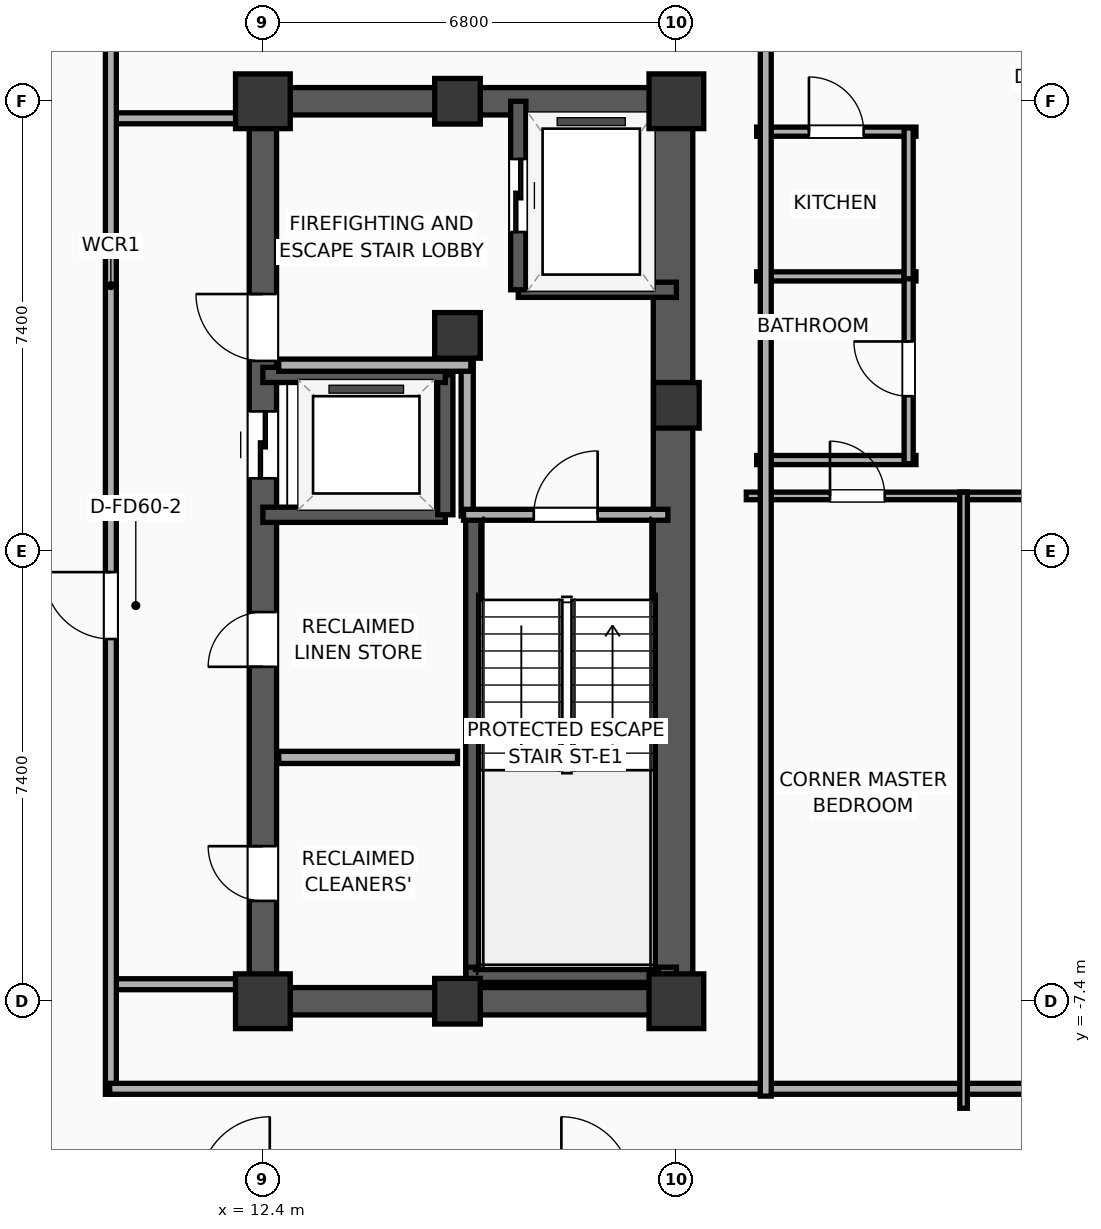
"""IFC4 building model, lengths in metres.
Left out: names, types, materials, properties, quantities, classifications, styles, units other than length and angle.
Written with IfcOpenShell. Run it as: python <this file> out.ifc"""

import sys

from ifc_helpers import new_model, si_unit, direction, frame, frame_2d, origin, origin_2d, place, context, subcontext, project, spatial, rectangle, extrude, element, fill, save


model = new_model("IFC4")
c1 = context("Model", 3, precision=1e-05, world=origin(), true_north=direction((0.0, 1.0)))
c2 = subcontext(c1, "Body", "Model", "MODEL_VIEW")
j1 = project(units=[si_unit("LENGTHUNIT", "METRE"), si_unit("PLANEANGLEUNIT", "RADIAN")], contexts=[c1])
p1 = place(None, origin())
s1 = spatial("IfcSite", under=j1, at=p1, CompositionType="ELEMENT")
p2 = place(p1, origin())
s2 = spatial("IfcBuilding", under=s1, at=p2, CompositionType="ELEMENT")
p3 = place(p2, frame((0.0, 0.0, 250.9)))
s3 = spatial("IfcBuildingStorey", under=s2, at=p3, CompositionType="ELEMENT", Elevation=250.9)
p4 = place(p3, frame((12.4, -7.4, 0.0), z_axis=(0.0, 0.0, 1.0), x_axis=(1.0, 0.0, 0.0)))
e1 = element("IfcColumn", 1, at=p4, inside=s3, PredefinedType="COLUMN", context=c2, shape_type="SweptSolid", body=[
    extrude(rectangle(XDim=0.9, YDim=0.9, at=origin_2d()), origin(), (0.0, 0.0, 1.0), 3.9),
])
p5 = place(p3, frame((15.6, 3.55, 0.0), z_axis=(0.0, 0.0, 1.0), x_axis=(1.0, 0.0, 0.0)))
e2 = element("IfcColumn", 2, at=p5, inside=s3, PredefinedType="COLUMN", context=c2, shape_type="SweptSolid", body=[
    extrude(rectangle(XDim=0.75, YDim=0.75, at=origin_2d()), origin(), (0.0, 0.0, 1.0), 3.9),
])
p6 = place(p3, frame((12.4, 7.4, 0.0), z_axis=(0.0, 0.0, 1.0), x_axis=(1.0, 0.0, 0.0)))
e3 = element("IfcColumn", 3, at=p6, inside=s3, PredefinedType="COLUMN", context=c2, shape_type="SweptSolid", body=[
    extrude(rectangle(XDim=0.9, YDim=0.9, at=origin_2d()), origin(), (0.0, 0.0, 1.0), 3.9),
])
for number, where, z_axis, x_axis in (
    (4, (15.6, -7.4, 0.0), (0.0, 0.0, 1.0), (1.0, 0.0, 0.0)),
    (5, (15.6, 7.4, 0.0), (0.0, 0.0, 1.0), (1.0, 0.0, 0.0)),
):
    element("IfcColumn", number, at=place(p3, frame(where, z_axis=z_axis, x_axis=x_axis)), inside=s3, PredefinedType="COLUMN", context=c2, shape_type="SweptSolid", body=[
        extrude(rectangle(XDim=0.75, YDim=0.75, at=origin_2d()), origin(), (0.0, 0.0, 1.0), 3.9),
    ])
p7 = place(p3, frame((19.2, -7.4, 0.0), z_axis=(0.0, 0.0, 1.0), x_axis=(1.0, 0.0, 0.0)))
e6 = element("IfcColumn", 6, at=p7, inside=s3, PredefinedType="COLUMN", context=c2, shape_type="SweptSolid", body=[
    extrude(rectangle(XDim=0.9, YDim=0.9, at=origin_2d()), origin(), (0.0, 0.0, 1.0), 3.9),
])
p8 = place(p3, frame((19.2, 2.4, 0.0), z_axis=(0.0, 0.0, 1.0), x_axis=(1.0, 0.0, 0.0)))
e7 = element("IfcColumn", 7, at=p8, inside=s3, PredefinedType="COLUMN", context=c2, shape_type="SweptSolid", body=[
    extrude(rectangle(XDim=0.75, YDim=0.75, at=origin_2d()), origin(), (0.0, 0.0, 1.0), 3.9),
])
p9 = place(p3, frame((19.2, 7.4, 0.0), z_axis=(0.0, 0.0, 1.0), x_axis=(1.0, 0.0, 0.0)))
e8 = element("IfcColumn", 8, at=p9, inside=s3, PredefinedType="COLUMN", context=c2, shape_type="SweptSolid", body=[
    extrude(rectangle(XDim=0.9, YDim=0.9, at=origin_2d()), origin(), (0.0, 0.0, 1.0), 3.9),
])
for number, where, z_axis, x_axis in (
    (9, (12.175, -7.4, 0.0), (0.0, 0.0, 1.0), (1.0, 0.0, 0.0)),
    (10, (12.175, 7.4, 0.0), (0.0, 0.0, 1.0), (1.0, 0.0, 0.0)),
):
    element("IfcWall", number, at=place(p3, frame(where, z_axis=z_axis, x_axis=x_axis)), inside=s3, PredefinedType="SHEAR", context=c2, shape_type="SweptSolid", body=[
        extrude(rectangle(XDim=7.25, YDim=0.45, at=frame_2d((3.625, 0.0))), origin(), (0.0, 0.0, 1.0), 3.5),
    ])
p10 = place(p3, frame((12.4, -7.4, 0.0), z_axis=(0.0, 0.0, 1.0), x_axis=(0.0, 1.0, 0.0)))
e11 = element("IfcWall", 11, at=p10, inside=s3, PredefinedType="SHEAR", context=c2, shape_type="SweptSolid", body=[
    extrude(rectangle(XDim=14.8, YDim=0.45, at=frame_2d((7.4, 0.0))), origin(), (0.0, 0.0, 1.0), 3.5),
])
p11 = place(p10, frame((8.6, 0.0, 0.0)))
e12 = element("IfcOpeningElement", 12, at=p11, cuts=e11, PredefinedType="OPENING", context=c2, shape_type="SweptSolid", body=[
    extrude(rectangle(XDim=1.1, YDim=2.05, at=frame_2d((0.55, 1.025))), frame((0.0, 0.235, 0.0), z_axis=(0.0, -1.0, 0.0), x_axis=(1.0, 0.0, 0.0)), (0.0, 0.0, 1.0), 0.47),
])
p12 = place(p10, frame((10.53, 0.0, 0.0)))
e13 = element("IfcOpeningElement", 13, at=p12, cuts=e11, PredefinedType="OPENING", context=c2, shape_type="SweptSolid", body=[
    extrude(rectangle(XDim=1.1, YDim=2.05, at=frame_2d((0.55, 1.025))), frame((0.0, 0.235, 0.0), z_axis=(0.0, -1.0, 0.0), x_axis=(1.0, 0.0, 0.0)), (0.0, 0.0, 1.0), 0.47),
])
p13 = place(p10, frame((1.65, 0.0, 0.0)))
e14 = element("IfcOpeningElement", 14, at=p13, cuts=e11, PredefinedType="OPENING", context=c2, shape_type="SweptSolid", body=[
    extrude(rectangle(XDim=0.9, YDim=2.05, at=frame_2d((0.45, 1.025))), frame((0.0, 0.235, 0.0), z_axis=(0.0, -1.0, 0.0), x_axis=(1.0, 0.0, 0.0)), (0.0, 0.0, 1.0), 0.47),
])
p14 = place(p10, frame((5.5, 0.0, 0.0)))
e15 = element("IfcOpeningElement", 15, at=p14, cuts=e11, PredefinedType="OPENING", context=c2, shape_type="SweptSolid", body=[
    extrude(rectangle(XDim=0.9, YDim=2.05, at=frame_2d((0.45, 1.025))), frame((0.0, 0.235, 0.0), z_axis=(0.0, -1.0, 0.0), x_axis=(1.0, 0.0, 0.0)), (0.0, 0.0, 1.0), 0.47),
])
p15 = place(p3, frame((19.145, -7.4, 0.0), z_axis=(0.0, 0.0, 1.0), x_axis=(0.0, 1.0, 0.0)))
e16 = element("IfcWall", 16, at=p15, inside=s3, PredefinedType="SHEAR", context=c2, shape_type="SweptSolid", body=[
    extrude(rectangle(XDim=14.8, YDim=0.65, at=frame_2d((7.4, 0.0))), origin(), (0.0, 0.0, 1.0), 3.5),
])
p16 = place(p3, frame((15.86, -7.085, 0.0), z_axis=(0.0, 0.0, 1.0), x_axis=(0.0, 1.0, 0.0)))
e17 = element("IfcWall", 17, at=p16, inside=s3, PredefinedType="SOLIDWALL", context=c2, shape_type="SweptSolid", body=[
    extrude(rectangle(XDim=7.685, YDim=0.25, at=frame_2d((3.843, 0.0))), origin(), (0.0, 0.0, 1.0), 3.5),
])
p17 = place(p3, frame((15.74, -6.965, 0.0), z_axis=(0.0, 0.0, 1.0), x_axis=(1.0, 0.0, 0.0)))
e18 = element("IfcWall", 18, at=p17, inside=s3, PredefinedType="SOLIDWALL", context=c2, shape_type="SweptSolid", body=[
    extrude(rectangle(XDim=3.46, YDim=0.25, at=frame_2d((1.73, 0.0))), origin(), (0.0, 0.0, 1.0), 3.5),
])
p18 = place(p3, frame((16.6, 4.3, 0.0), z_axis=(0.0, 0.0, 1.0), x_axis=(1.0, 0.0, 0.0)))
e19 = element("IfcWall", 19, at=p18, inside=s3, PredefinedType="SOLIDWALL", context=c2, shape_type="SweptSolid", body=[
    extrude(rectangle(XDim=2.6, YDim=0.25, at=frame_2d((1.3, 0.0))), origin(), (0.0, 0.0, 1.0), 3.5),
])
p19 = place(p3, frame((16.6, 7.4, 0.0), z_axis=(0.0, 0.0, 1.0), x_axis=(0.0, -1.0, 0.0)))
e20 = element("IfcWall", 20, at=p19, inside=s3, PredefinedType="SOLIDWALL", context=c2, shape_type="SweptSolid", body=[
    extrude(rectangle(XDim=3.1, YDim=0.25, at=frame_2d((1.55, 0.0))), origin(), (0.0, 0.0, 1.0), 3.5),
])
p20 = place(p19, frame((0.95, 0.0, 0.0)))
e21 = element("IfcOpeningElement", 21, at=p20, cuts=e20, PredefinedType="OPENING", context=c2, shape_type="SweptSolid", body=[
    extrude(rectangle(XDim=1.2, YDim=2.05, at=frame_2d((0.6, 1.025))), frame((0.0, 0.135, 0.0), z_axis=(0.0, -1.0, 0.0), x_axis=(1.0, 0.0, 0.0)), (0.0, 0.0, 1.0), 0.27),
])
p21 = place(p3, frame((12.4, 0.6, 0.0), z_axis=(0.0, 0.0, 1.0), x_axis=(1.0, 0.0, 0.0)))
e22 = element("IfcWall", 22, at=p21, inside=s3, PredefinedType="SOLIDWALL", context=c2, shape_type="SweptSolid", body=[
    extrude(rectangle(XDim=3.0, YDim=0.25, at=frame_2d((1.5, 0.0))), origin(), (0.0, 0.0, 1.0), 3.5),
])
p22 = place(p3, frame((15.4, 0.6, 0.0), z_axis=(0.0, 0.0, 1.0), x_axis=(0.0, 1.0, 0.0)))
e23 = element("IfcWall", 23, at=p22, inside=s3, PredefinedType="SOLIDWALL", context=c2, shape_type="SweptSolid", body=[
    extrude(rectangle(XDim=2.3, YDim=0.25, at=frame_2d((1.15, 0.0))), origin(), (0.0, 0.0, 1.0), 3.5),
])
p23 = place(p3, frame((15.4, 2.9, 0.0), z_axis=(0.0, 0.0, 1.0), x_axis=(-1.0, 0.0, 0.0)))
e24 = element("IfcWall", 24, at=p23, inside=s3, PredefinedType="SOLIDWALL", context=c2, shape_type="SweptSolid", body=[
    extrude(rectangle(XDim=3.0, YDim=0.25, at=frame_2d((1.5, 0.0))), origin(), (0.0, 0.0, 1.0), 3.5),
])
p24 = place(p3, frame((15.76, 0.58, 0.0), z_axis=(0.0, 0.0, 1.0), x_axis=(0.0, 1.0, 0.0)))
e25 = element("IfcWall", 25, at=p24, inside=s3, PredefinedType="PARTITIONING", context=c2, shape_type="SweptSolid", body=[
    extrude(rectangle(XDim=2.52, YDim=0.2, at=frame_2d((1.26, 0.0))), origin(), (0.0, 0.0, 1.0), 3.5),
])
p25 = place(p3, frame((12.66, 3.06, 0.0), z_axis=(0.0, 0.0, 1.0), x_axis=(1.0, 0.0, 0.0)))
e26 = element("IfcWall", 26, at=p25, inside=s3, PredefinedType="PARTITIONING", context=c2, shape_type="SweptSolid", body=[
    extrude(rectangle(XDim=3.16, YDim=0.2, at=frame_2d((1.58, 0.0))), origin(), (0.0, 0.0, 1.0), 3.5),
])
p26 = place(p3, frame((15.7, 0.6, 0.0), z_axis=(0.0, 0.0, 1.0), x_axis=(1.0, 0.0, 0.0)))
e27 = element("IfcWall", 27, at=p26, inside=s3, PredefinedType="PARTITIONING", context=c2, shape_type="SweptSolid", body=[
    extrude(rectangle(XDim=3.36, YDim=0.18, at=frame_2d((1.68, 0.0))), origin(), (0.0, 0.0, 1.0), 3.5),
])
p27 = place(p26, frame((1.155, 0.0, 0.0)))
e28 = element("IfcOpeningElement", 28, at=p27, cuts=e27, PredefinedType="OPENING", context=c2, shape_type="SweptSolid", body=[
    extrude(rectangle(XDim=1.05, YDim=2.05, at=frame_2d((0.525, 1.025))), frame((0.0, 0.1, 0.0), z_axis=(0.0, -1.0, 0.0), x_axis=(1.0, 0.0, 0.0)), (0.0, 0.0, 1.0), 0.2),
])
p28 = place(p3, frame((12.66, -3.39, 0.0), z_axis=(0.0, 0.0, 1.0), x_axis=(1.0, 0.0, 0.0)))
e29 = element("IfcWall", 29, at=p28, inside=s3, PredefinedType="PARTITIONING", context=c2, shape_type="SweptSolid", body=[
    extrude(rectangle(XDim=2.94, YDim=0.2, at=frame_2d((1.47, 0.0))), origin(), (0.0, 0.0, 1.0), 3.5),
])
for number, where, z_axis, x_axis in (
    (30, (9.88, 7.12, 0.0), (0.0, 0.0, 1.0), (1.0, 0.0, 0.0)),
    (31, (9.88, -7.12, 0.0), (0.0, 0.0, 1.0), (1.0, 0.0, 0.0)),
):
    element("IfcWall", number, at=place(p3, frame(where, z_axis=z_axis, x_axis=x_axis)), inside=s3, PredefinedType="PARTITIONING", context=c2, shape_type="SweptSolid", body=[
        extrude(rectangle(XDim=2.27, YDim=0.18, at=frame_2d((1.135, 0.0))), origin(), (0.0, 0.0, 1.0), 2.54),
    ])
p29 = place(p3, frame((9.9, -8.93, 0.0), z_axis=(0.0, 0.0, 1.0), x_axis=(0.0, 1.0, 0.0)))
e32 = element("IfcWall", 32, at=p29, inside=s3, PredefinedType="PARTITIONING", context=c2, shape_type="SweptSolid", body=[
    extrude(rectangle(XDim=17.86, YDim=0.18, at=frame_2d((8.93, 0.0))), origin(), (0.0, 0.0, 1.0), 3.5),
])
p30 = place(p29, frame((7.487, 0.0, 0.0)))
e33 = element("IfcOpeningElement", 33, at=p30, cuts=e32, PredefinedType="OPENING", context=c2, shape_type="SweptSolid", body=[
    extrude(rectangle(XDim=1.1, YDim=2.05, at=frame_2d((0.55, 1.025))), frame((0.0, 0.1, 0.0), z_axis=(0.0, -1.0, 0.0), x_axis=(1.0, 0.0, 0.0)), (0.0, 0.0, 1.0), 0.2),
])
p31 = place(p3, frame((9.88, -8.84, 0.0), z_axis=(0.0, 0.0, 1.0), x_axis=(1.0, 0.0, 0.0)))
e34 = element("IfcWall", 34, at=p31, inside=s3, PredefinedType="PARTITIONING", context=c2, shape_type="SweptSolid", body=[
    extrude(rectangle(XDim=20.35, YDim=0.18, at=frame_2d((10.175, 0.0))), origin(), (0.0, 0.0, 1.0), 3.5),
])
p32 = place(p3, frame((20.52, 6.9, 0.0), z_axis=(0.0, 0.0, 1.0), x_axis=(1.0, 0.0, 0.0)))
e35 = element("IfcWall", 35, at=p32, inside=s3, PredefinedType="PLUMBINGWALL", context=c2, shape_type="SweptSolid", body=[
    extrude(rectangle(XDim=2.62, YDim=0.15, at=frame_2d((1.31, 0.0))), origin(), (0.0, 0.0, 1.0), 2.39),
])
p33 = place(p32, frame((0.86, 0.0, 0.0)))
e36 = element("IfcOpeningElement", 36, at=p33, cuts=e35, PredefinedType="OPENING", context=c2, shape_type="SweptSolid", body=[
    extrude(rectangle(XDim=0.9, YDim=2.05, at=frame_2d((0.45, 1.025))), frame((0.0, 0.085, 0.0), z_axis=(0.0, -1.0, 0.0), x_axis=(1.0, 0.0, 0.0)), (0.0, 0.0, 1.0), 0.17),
])
for number, where, z_axis, x_axis in (
    (37, (20.52, 4.52, 0.0), (0.0, 0.0, 1.0), (1.0, 0.0, 0.0)),
    (38, (20.52, 1.5, 0.0), (0.0, 0.0, 1.0), (1.0, 0.0, 0.0)),
):
    element("IfcWall", number, at=place(p3, frame(where, z_axis=z_axis, x_axis=x_axis)), inside=s3, PredefinedType="PLUMBINGWALL", context=c2, shape_type="SweptSolid", body=[
        extrude(rectangle(XDim=2.62, YDim=0.15, at=frame_2d((1.31, 0.0))), origin(), (0.0, 0.0, 1.0), 3.5),
    ])
p34 = place(p3, frame((23.02, 1.44, 0.0), z_axis=(0.0, 0.0, 1.0), x_axis=(0.0, 1.0, 0.0)))
e39 = element("IfcWall", 39, at=p34, inside=s3, PredefinedType="PLUMBINGWALL", context=c2, shape_type="SweptSolid", body=[
    extrude(rectangle(XDim=3.12, YDim=0.15, at=frame_2d((1.56, 0.0))), origin(), (0.0, 0.0, 1.0), 3.5),
])
p35 = place(p34, frame((1.11, 0.0, 0.0)))
e40 = element("IfcOpeningElement", 40, at=p35, cuts=e39, PredefinedType="OPENING", context=c2, shape_type="SweptSolid", body=[
    extrude(rectangle(XDim=0.9, YDim=2.05, at=frame_2d((0.45, 1.025))), frame((0.0, 0.085, 0.0), z_axis=(0.0, -1.0, 0.0), x_axis=(1.0, 0.0, 0.0)), (0.0, 0.0, 1.0), 0.17),
])
p36 = place(p3, frame((23.02, 4.48, 0.0), z_axis=(0.0, 0.0, 1.0), x_axis=(0.0, 1.0, 0.0)))
e41 = element("IfcWall", 41, at=p36, inside=s3, PredefinedType="PLUMBINGWALL", context=c2, shape_type="SweptSolid", body=[
    extrude(rectangle(XDim=2.48, YDim=0.15, at=frame_2d((1.24, 0.0))), origin(), (0.0, 0.0, 1.0), 3.5),
])
p37 = place(p3, frame((20.35, 0.91, 0.0), z_axis=(0.0, 0.0, 1.0), x_axis=(1.0, 0.0, 0.0)))
e42 = element("IfcWall", 42, at=p37, inside=s3, PredefinedType="PARTITIONING", context=c2, shape_type="SweptSolid", body=[
    extrude(rectangle(XDim=3.635, YDim=0.125, at=frame_2d((1.818, 0.0))), origin(), (0.0, 0.0, 1.0), 3.5),
])
p38 = place(p37, frame((1.376, 0.0, 0.0)))
e43 = element("IfcOpeningElement", 43, at=p38, cuts=e42, PredefinedType="OPENING", context=c2, shape_type="SweptSolid", body=[
    extrude(rectangle(XDim=0.9, YDim=2.05, at=frame_2d((0.45, 1.025))), frame((0.0, 0.073, 0.0), z_axis=(0.0, -1.0, 0.0), x_axis=(1.0, 0.0, 0.0)), (0.0, 0.0, 1.0), 0.145),
])
p39 = place(p3, frame((23.861, 0.91, 0.0), z_axis=(0.0, 0.0, 1.0), x_axis=(1.0, 0.0, 0.0)))
e44 = element("IfcWall", 44, at=p39, inside=s3, PredefinedType="PARTITIONING", context=c2, shape_type="SweptSolid", body=[
    extrude(rectangle(XDim=3.282, YDim=0.125, at=frame_2d((1.641, 0.0))), origin(), (0.0, 0.0, 1.0), 3.5),
])
p40 = place(p39, frame((1.191, 0.0, 0.0)))
e45 = element("IfcOpeningElement", 45, at=p40, cuts=e44, PredefinedType="OPENING", context=c2, shape_type="SweptSolid", body=[
    extrude(rectangle(XDim=0.9, YDim=2.05, at=frame_2d((0.45, 1.025))), frame((0.0, 0.073, 0.0), z_axis=(0.0, -1.0, 0.0), x_axis=(1.0, 0.0, 0.0)), (0.0, 0.0, 1.0), 0.145),
])
p41 = place(p3, frame((23.923, -9.16, 0.0), z_axis=(0.0, 0.0, 1.0), x_axis=(0.0, 1.0, 0.0)))
e46 = element("IfcWall", 46, at=p41, inside=s3, PredefinedType="PARTITIONING", context=c2, shape_type="SweptSolid", body=[
    extrude(rectangle(XDim=10.13, YDim=0.125, at=frame_2d((5.065, 0.0))), origin(), (0.0, 0.0, 1.0), 2.39),
])
p42 = place(p3, frame((20.67, -8.96, 0.0), z_axis=(0.0, 0.0, 1.0), x_axis=(0.0, 1.0, 0.0)))
e47 = element("IfcWall", 47, at=p42, inside=s3, PredefinedType="PARTITIONING", context=c2, shape_type="SweptSolid", body=[
    extrude(rectangle(XDim=17.92, YDim=0.18, at=frame_2d((8.96, 0.0))), origin(), (0.0, 0.0, 1.0), 3.5),
])
p43 = place(p20, origin())
e48 = element("IfcDoor", 48, at=p43, inside=s3, OperationType="SLIDING_TO_LEFT", PredefinedType="DOOR", context=c2, shape_type="SweptSolid", body=[
    extrude(rectangle(XDim=1.2, YDim=2.05, at=frame_2d((0.6, 1.025))), frame((0.0, 0.025, 0.0), z_axis=(0.0, -1.0, 0.0), x_axis=(1.0, 0.0, 0.0)), (0.0, 0.0, 1.0), 0.05),
])
fill(e21, e48)
p44 = place(p11, origin())
e49 = element("IfcDoor", 49, at=p44, inside=s3, OperationType="SLIDING_TO_LEFT", PredefinedType="DOOR", context=c2, shape_type="SweptSolid", body=[
    extrude(rectangle(XDim=1.1, YDim=2.05, at=frame_2d((0.55, 1.025))), frame((0.0, 0.025, 0.0), z_axis=(0.0, -1.0, 0.0), x_axis=(1.0, 0.0, 0.0)), (0.0, 0.0, 1.0), 0.05),
])
fill(e12, e49)
p45 = place(p27, origin())
e50 = element("IfcDoor", 50, at=p45, inside=s3, OperationType="SINGLE_SWING_RIGHT", PredefinedType="DOOR", context=c2, shape_type="SweptSolid", body=[
    extrude(rectangle(XDim=1.05, YDim=2.05, at=frame_2d((0.525, 1.025))), frame((0.0, 0.025, 0.0), z_axis=(0.0, -1.0, 0.0), x_axis=(1.0, 0.0, 0.0)), (0.0, 0.0, 1.0), 0.05),
])
fill(e28, e50)
p46 = place(p30, origin())
e51 = element("IfcDoor", 51, at=p46, inside=s3, OperationType="SINGLE_SWING_RIGHT", PredefinedType="DOOR", context=c2, shape_type="SweptSolid", body=[
    extrude(rectangle(XDim=1.1, YDim=2.05, at=frame_2d((0.55, 1.025))), frame((0.0, 0.025, 0.0), z_axis=(0.0, -1.0, 0.0), x_axis=(1.0, 0.0, 0.0)), (0.0, 0.0, 1.0), 0.05),
])
fill(e33, e51)
p47 = place(p33, origin())
e52 = element("IfcDoor", 52, at=p47, inside=s3, OperationType="SINGLE_SWING_LEFT", PredefinedType="DOOR", context=c2, shape_type="SweptSolid", body=[
    extrude(rectangle(XDim=0.9, YDim=2.05, at=frame_2d((0.45, 1.025))), frame((0.0, 0.025, 0.0), z_axis=(0.0, -1.0, 0.0), x_axis=(1.0, 0.0, 0.0)), (0.0, 0.0, 1.0), 0.05),
])
fill(e36, e52)
p48 = place(p35, origin())
e53 = element("IfcDoor", 53, at=p48, inside=s3, OperationType="SINGLE_SWING_RIGHT", PredefinedType="DOOR", context=c2, shape_type="SweptSolid", body=[
    extrude(rectangle(XDim=0.9, YDim=2.05, at=frame_2d((0.45, 1.025))), frame((0.0, 0.025, 0.0), z_axis=(0.0, -1.0, 0.0), x_axis=(1.0, 0.0, 0.0)), (0.0, 0.0, 1.0), 0.05),
])
fill(e40, e53)
p49 = place(p38, origin())
e54 = element("IfcDoor", 54, at=p49, inside=s3, OperationType="SINGLE_SWING_LEFT", PredefinedType="DOOR", context=c2, shape_type="SweptSolid", body=[
    extrude(rectangle(XDim=0.9, YDim=2.05, at=frame_2d((0.45, 1.025))), frame((0.0, 0.025, 0.0), z_axis=(0.0, -1.0, 0.0), x_axis=(1.0, 0.0, 0.0)), (0.0, 0.0, 1.0), 0.05),
])
fill(e43, e54)
p50 = place(p12, origin())
e55 = element("IfcDoor", 55, at=p50, inside=s3, OperationType="SINGLE_SWING_RIGHT", PredefinedType="DOOR", context=c2, shape_type="SweptSolid", body=[
    extrude(rectangle(XDim=1.1, YDim=2.05, at=frame_2d((0.55, 1.025))), frame((0.0, 0.025, 0.0), z_axis=(0.0, -1.0, 0.0), x_axis=(1.0, 0.0, 0.0)), (0.0, 0.0, 1.0), 0.05),
])
fill(e13, e55)
p51 = place(p13, origin())
e56 = element("IfcDoor", 56, at=p51, inside=s3, OperationType="SINGLE_SWING_RIGHT", PredefinedType="DOOR", context=c2, shape_type="SweptSolid", body=[
    extrude(rectangle(XDim=0.9, YDim=2.05, at=frame_2d((0.45, 1.025))), frame((0.0, 0.025, 0.0), z_axis=(0.0, -1.0, 0.0), x_axis=(1.0, 0.0, 0.0)), (0.0, 0.0, 1.0), 0.05),
])
fill(e14, e56)
p52 = place(p14, origin())
e57 = element("IfcDoor", 57, at=p52, inside=s3, OperationType="SINGLE_SWING_LEFT", PredefinedType="DOOR", context=c2, shape_type="SweptSolid", body=[
    extrude(rectangle(XDim=0.9, YDim=2.05, at=frame_2d((0.45, 1.025))), frame((0.0, 0.025, 0.0), z_axis=(0.0, -1.0, 0.0), x_axis=(1.0, 0.0, 0.0)), (0.0, 0.0, 1.0), 0.05),
])
fill(e15, e57)
save(model, sys.argv[1])
